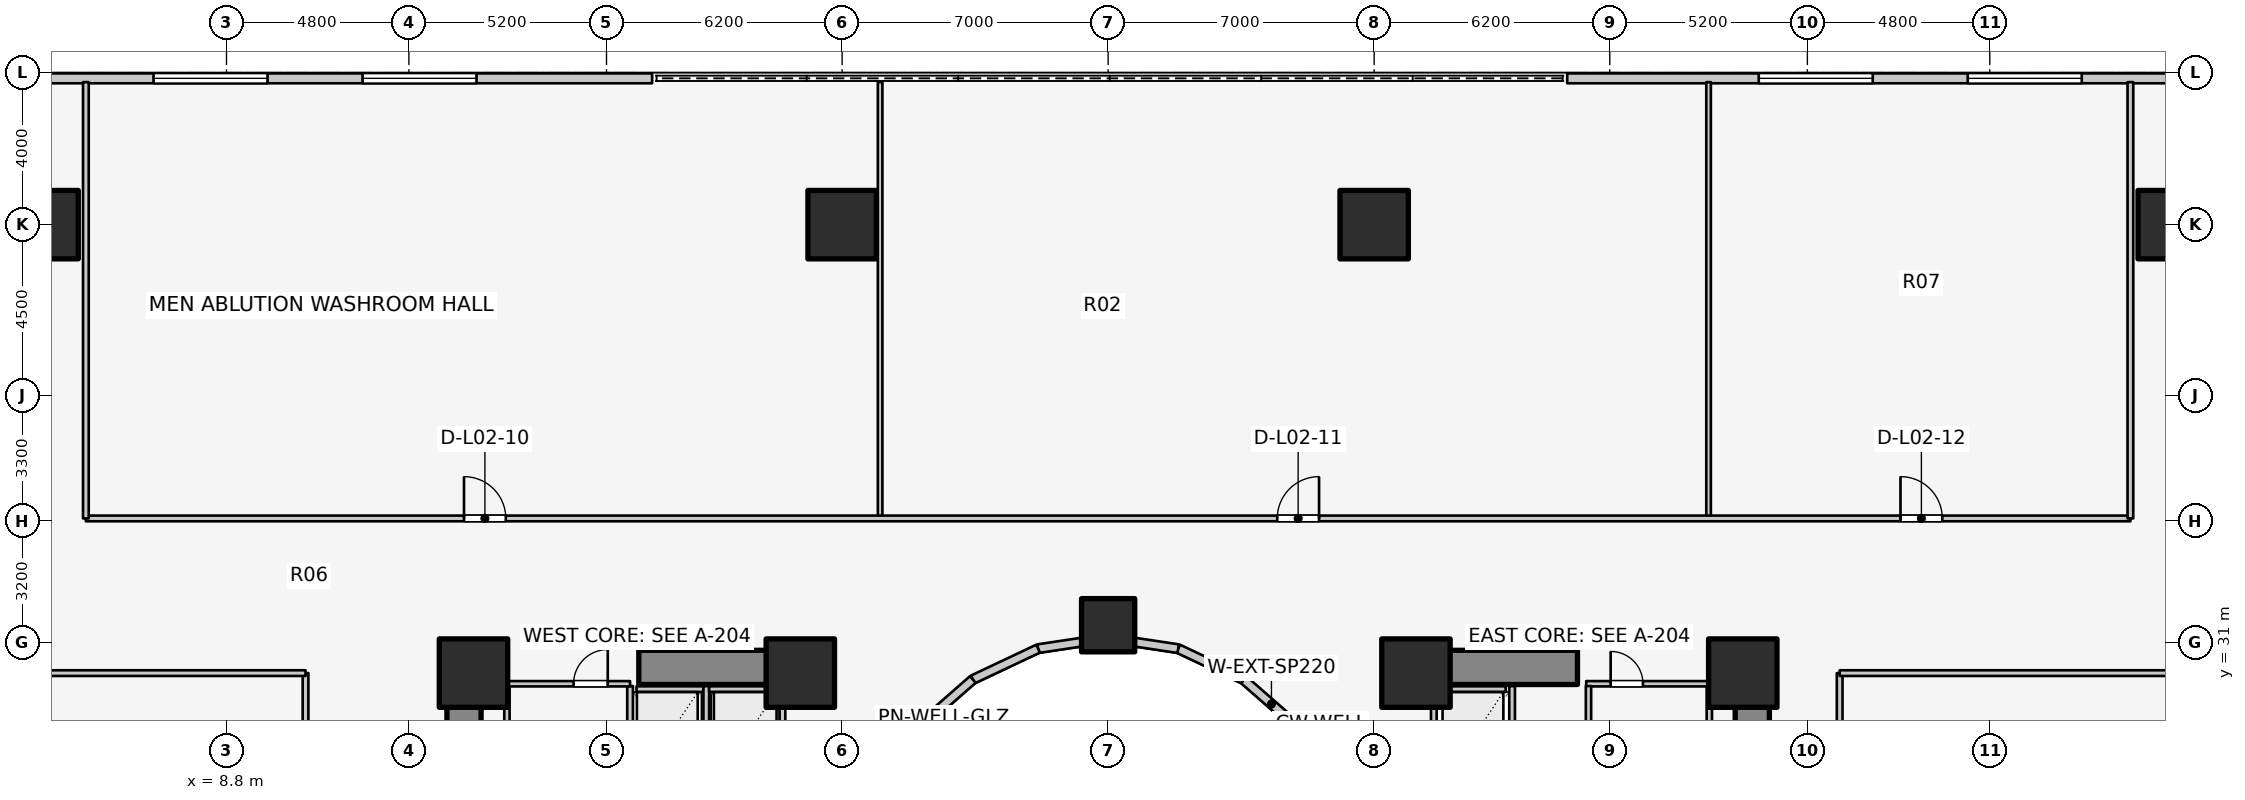
"""IFC4 building model, lengths in metres.
Left out: names, types, materials, properties, quantities, classifications, styles, units other than length and angle.
Written with IfcOpenShell. Run it as: python <this file> out.ifc"""

import sys

from ifc_helpers import new_model, si_unit, direction, frame, frame_2d, origin, origin_2d, place, context, subcontext, project, spatial, rectangle, extrude, element, fill, save


model = new_model("IFC4")
c1 = context("Model", 3, precision=1e-05, world=origin(), true_north=direction((0.0, 1.0)))
c2 = subcontext(c1, "Body", "Model", "MODEL_VIEW")
j1 = project(units=[si_unit("LENGTHUNIT", "METRE"), si_unit("PLANEANGLEUNIT", "RADIAN")], contexts=[c1])
p1 = place(None, origin())
s1 = spatial("IfcSite", under=j1, at=p1, CompositionType="ELEMENT")
p2 = place(p1, origin())
s2 = spatial("IfcBuilding", under=s1, at=p2, CompositionType="ELEMENT")
p3 = place(p2, frame((0.0, 0.0, 4.6)))
s3 = spatial("IfcBuildingStorey", under=s2, at=p3, CompositionType="ELEMENT", Elevation=4.6)
p4 = place(p3, frame((15.05, 17.05, 0.0), z_axis=(0.0, 0.0, 1.0), x_axis=(0.0, 1.0, 0.0)))
e1 = element("IfcWall", 1, at=p4, inside=s3, PredefinedType="SHEAR", context=c2, shape_type="SweptSolid", body=[
    extrude(rectangle(XDim=12.8, YDim=0.9, at=frame_2d((6.4, 0.0))), origin(), (0.0, 0.0, 1.0), 4.6),
])
p5 = place(p3, frame((19.65, 30.35, 0.0), z_axis=(0.0, 0.0, 1.0), x_axis=(1.0, 0.0, 0.0)))
e2 = element("IfcWall", 2, at=p5, inside=s3, PredefinedType="SHEAR", context=c2, shape_type="SweptSolid", body=[
    extrude(rectangle(XDim=4.5, YDim=0.9, at=frame_2d((2.25, 0.0))), origin(), (0.0, 0.0, 1.0), 4.6),
])
p6 = place(p3, frame((48.95, 17.05, 0.0), z_axis=(0.0, 0.0, 1.0), x_axis=(0.0, 1.0, 0.0)))
e3 = element("IfcWall", 3, at=p6, inside=s3, PredefinedType="SHEAR", context=c2, shape_type="SweptSolid", body=[
    extrude(rectangle(XDim=12.8, YDim=0.9, at=frame_2d((6.4, 0.0))), origin(), (0.0, 0.0, 1.0), 4.6),
])
p7 = place(p3, frame((39.85, 30.35, 0.0), z_axis=(0.0, 0.0, 1.0), x_axis=(1.0, 0.0, 0.0)))
e4 = element("IfcWall", 4, at=p7, inside=s3, PredefinedType="SHEAR", context=c2, shape_type="SweptSolid", body=[
    extrude(rectangle(XDim=4.5, YDim=0.9, at=frame_2d((2.25, 0.0))), origin(), (0.0, 0.0, 1.0), 4.6),
])
for number, where, z_axis, x_axis in (
    (5, (23.9, 30.2, 0.0), (0.0, 0.0, 1.0), (1.0, 0.0, 0.0)),
    (6, (15.3, 30.2, 0.0), (0.0, 0.0, 1.0), (1.0, 0.0, 0.0)),
    (7, (48.7, 30.2, 0.0), (0.0, 0.0, 1.0), (1.0, 0.0, 0.0)),
    (8, (40.1, 30.2, 0.0), (0.0, 0.0, 1.0), (1.0, 0.0, 0.0)),
    (9, (60.0, 42.0, 0.0), (0.0, 0.0, 1.0), (1.0, 0.0, 0.0)),
    (10, (39.0, 42.0, 0.0), (0.0, 0.0, 1.0), (1.0, 0.0, 0.0)),
    (11, (25.0, 42.0, 0.0), (0.0, 0.0, 1.0), (1.0, 0.0, 0.0)),
    (12, (4.0, 42.0, 0.0), (0.0, 0.0, 1.0), (1.0, 0.0, 0.0)),
):
    element("IfcColumn", number, at=place(p3, frame(where, z_axis=z_axis, x_axis=x_axis)), inside=s3, PredefinedType="COLUMN", context=c2, shape_type="SweptSolid", body=[
        extrude(rectangle(XDim=1.8, YDim=1.8, at=origin_2d()), origin(), (0.0, 0.0, 1.0), 4.6),
    ])
p8 = place(p3, frame((32.0, 31.46, 0.0), z_axis=(0.0, 0.0, 1.0), x_axis=(1.0, 0.0, 0.0)))
e13 = element("IfcColumn", 13, at=p8, inside=s3, PredefinedType="COLUMN", context=c2, shape_type="SweptSolid", body=[
    extrude(rectangle(XDim=1.4, YDim=1.4, at=origin_2d()), origin(), (0.0, 0.0, 1.0), 4.6),
])
p9 = place(p3, frame((63.72, 45.85, 0.0), z_axis=(0.0, 0.0, 1.0), x_axis=(-1.0, 0.0, 0.0)))
e14 = element("IfcWall", 14, at=p9, inside=s3, PredefinedType="STANDARD", context=c2, shape_type="SweptSolid", body=[
    extrude(rectangle(XDim=19.64, YDim=0.26, at=frame_2d((9.82, 0.0))), origin(), (0.0, 0.0, 1.0), 4.28),
])
p10 = place(p9, frame((6.1, 0.0, 0.9)))
e15 = element("IfcOpeningElement", 15, at=p10, cuts=e14, PredefinedType="OPENING", context=c2, shape_type="SweptSolid", body=[
    extrude(rectangle(XDim=3.0, YDim=2.4, at=frame_2d((1.5, 1.2))), frame((0.0, 0.14, 0.0), z_axis=(0.0, -1.0, 0.0), x_axis=(1.0, 0.0, 0.0)), (0.0, 0.0, 1.0), 0.28),
])
p11 = place(p9, frame((11.6, 0.0, 0.9)))
e16 = element("IfcOpeningElement", 16, at=p11, cuts=e14, PredefinedType="OPENING", context=c2, shape_type="SweptSolid", body=[
    extrude(rectangle(XDim=3.0, YDim=2.4, at=frame_2d((1.5, 1.2))), frame((0.0, 0.14, 0.0), z_axis=(0.0, -1.0, 0.0), x_axis=(1.0, 0.0, 0.0)), (0.0, 0.0, 1.0), 0.28),
])
p12 = place(p3, frame((20.0, 45.85, 0.0), z_axis=(0.0, 0.0, 1.0), x_axis=(-1.0, 0.0, 0.0)))
e17 = element("IfcWall", 17, at=p12, inside=s3, PredefinedType="STANDARD", context=c2, shape_type="SweptSolid", body=[
    extrude(rectangle(XDim=19.72, YDim=0.26, at=frame_2d((9.86, 0.0))), origin(), (0.0, 0.0, 1.0), 4.28),
])
p13 = place(p12, frame((4.62, 0.0, 0.9)))
e18 = element("IfcOpeningElement", 18, at=p13, cuts=e17, PredefinedType="OPENING", context=c2, shape_type="SweptSolid", body=[
    extrude(rectangle(XDim=3.0, YDim=2.4, at=frame_2d((1.5, 1.2))), frame((0.0, 0.14, 0.0), z_axis=(0.0, -1.0, 0.0), x_axis=(1.0, 0.0, 0.0)), (0.0, 0.0, 1.0), 0.28),
])
p14 = place(p12, frame((10.12, 0.0, 0.9)))
e19 = element("IfcOpeningElement", 19, at=p14, cuts=e17, PredefinedType="OPENING", context=c2, shape_type="SweptSolid", body=[
    extrude(rectangle(XDim=3.0, YDim=2.4, at=frame_2d((1.5, 1.2))), frame((0.0, 0.14, 0.0), z_axis=(0.0, -1.0, 0.0), x_axis=(1.0, 0.0, 0.0)), (0.0, 0.0, 1.0), 0.28),
])
p15 = place(p3, frame((37.035, 28.742, 0.0), z_axis=(0.0, 0.0, 1.0), x_axis=(-0.752576694707, 0.658504607869, 0.0)))
e20 = element("IfcWall", 20, at=p15, inside=s3, PredefinedType="STANDARD", context=c2, shape_type="SweptSolid", body=[
    extrude(rectangle(XDim=1.959, YDim=0.23, at=frame_2d((0.98, 0.0))), origin(), (0.0, 0.0, 1.0), 3.28),
])
p16 = place(p3, frame((35.56, 30.032, 0.0), z_axis=(0.0, 0.0, 1.0), x_axis=(-0.904179699603, 0.427152280606, 0.0)))
e21 = element("IfcWall", 21, at=p16, inside=s3, PredefinedType="STANDARD", context=c2, shape_type="SweptSolid", body=[
    extrude(rectangle(XDim=1.899, YDim=0.23, at=frame_2d((0.95, 0.0))), origin(), (0.0, 0.0, 1.0), 3.28),
])
for number, where, z_axis, x_axis in (
    (22, (33.843, 30.843, 0.0), (0.0, 0.0, 1.0), (-0.989, 0.149, 0.0)),
    (23, (32.0, 31.12, 0.0), (0.0, 0.0, 1.0), (-0.989, -0.149, 0.0)),
):
    element("IfcWall", number, at=place(p3, frame(where, z_axis=z_axis, x_axis=x_axis)), inside=s3, PredefinedType="STANDARD", context=c2, shape_type="SweptSolid", body=[
        extrude(rectangle(XDim=1.864, YDim=0.23, at=frame_2d((0.932, 0.0))), origin(), (0.0, 0.0, 1.0), 3.28),
    ])
p17 = place(p3, frame((30.157, 30.843, 0.0), z_axis=(0.0, 0.0, 1.0), x_axis=(-0.904179699603, -0.427152280606, 0.0)))
e24 = element("IfcWall", 24, at=p17, inside=s3, PredefinedType="STANDARD", context=c2, shape_type="SweptSolid", body=[
    extrude(rectangle(XDim=1.899, YDim=0.23, at=frame_2d((0.95, 0.0))), origin(), (0.0, 0.0, 1.0), 3.28),
])
p18 = place(p3, frame((28.44, 30.032, 0.0), z_axis=(0.0, 0.0, 1.0), x_axis=(-0.752576694707, -0.658504607869, 0.0)))
e25 = element("IfcWall", 25, at=p18, inside=s3, PredefinedType="STANDARD", context=c2, shape_type="SweptSolid", body=[
    extrude(rectangle(XDim=1.959, YDim=0.23, at=frame_2d((0.98, 0.0))), origin(), (0.0, 0.0, 1.0), 3.28),
])
p19 = place(p3, frame((19.59, 29.78, 0.0), z_axis=(0.0, 0.0, 1.0), x_axis=(1.0, 0.0, 0.0)))
e26 = element("IfcWall", 26, at=p19, inside=s3, PredefinedType="SOLIDWALL", context=c2, shape_type="SweptSolid", body=[
    extrude(rectangle(XDim=1.76, YDim=0.15, at=frame_2d((0.88, 0.0))), origin(), (0.0, 0.0, 1.0), 4.255),
])
for number, where, z_axis, x_axis in (
    (27, (19.42, 27.14, 0.0), (0.0, 0.0, 1.0), (0.0, 1.0, 0.0)),
    (28, (21.425, 27.14, 0.0), (0.0, 0.0, 1.0), (0.0, 1.0, 0.0)),
):
    element("IfcWall", number, at=place(p3, frame(where, z_axis=z_axis, x_axis=x_axis)), inside=s3, PredefinedType="SOLIDWALL", context=c2, shape_type="SweptSolid", body=[
        extrude(rectangle(XDim=2.72, YDim=0.15, at=frame_2d((1.36, 0.0))), origin(), (0.0, 0.0, 1.0), 4.255),
    ])
p20 = place(p3, frame((21.5, 29.78, 0.0), z_axis=(0.0, 0.0, 1.0), x_axis=(1.0, 0.0, 0.0)))
e29 = element("IfcWall", 29, at=p20, inside=s3, PredefinedType="SOLIDWALL", context=c2, shape_type="SweptSolid", body=[
    extrude(rectangle(XDim=1.76, YDim=0.15, at=frame_2d((0.88, 0.0))), origin(), (0.0, 0.0, 1.0), 4.255),
])
p21 = place(p3, frame((23.43, 27.14, 0.0), z_axis=(0.0, 0.0, 1.0), x_axis=(0.0, 1.0, 0.0)))
e30 = element("IfcWall", 30, at=p21, inside=s3, PredefinedType="SOLIDWALL", context=c2, shape_type="SweptSolid", body=[
    extrude(rectangle(XDim=2.72, YDim=0.15, at=frame_2d((1.36, 0.0))), origin(), (0.0, 0.0, 1.0), 4.255),
])
p22 = place(p3, frame((40.74, 29.78, 0.0), z_axis=(0.0, 0.0, 1.0), x_axis=(1.0, 0.0, 0.0)))
e31 = element("IfcWall", 31, at=p22, inside=s3, PredefinedType="SOLIDWALL", context=c2, shape_type="SweptSolid", body=[
    extrude(rectangle(XDim=1.72, YDim=0.15, at=frame_2d((0.86, 0.0))), origin(), (0.0, 0.0, 1.0), 4.255),
])
for number, where, z_axis, x_axis in (
    (32, (40.57, 27.14, 0.0), (0.0, 0.0, 1.0), (0.0, 1.0, 0.0)),
    (33, (42.63, 27.14, 0.0), (0.0, 0.0, 1.0), (0.0, 1.0, 0.0)),
):
    element("IfcWall", number, at=place(p3, frame(where, z_axis=z_axis, x_axis=x_axis)), inside=s3, PredefinedType="SOLIDWALL", context=c2, shape_type="SweptSolid", body=[
        extrude(rectangle(XDim=2.72, YDim=0.15, at=frame_2d((1.36, 0.0))), origin(), (0.0, 0.0, 1.0), 4.255),
    ])
for number, where, z_axis, x_axis in (
    (34, (26.0, 34.32, 0.0), (0.0, 0.0, 1.0), (0.0, 1.0, 0.0)),
    (35, (47.8, 34.32, 0.0), (0.0, 0.0, 1.0), (0.0, 1.0, 0.0)),
):
    element("IfcWall", number, at=place(p3, frame(where, z_axis=z_axis, x_axis=x_axis)), inside=s3, PredefinedType="MOVABLE", context=c2, shape_type="SweptSolid", body=[
        extrude(rectangle(XDim=11.43, YDim=0.12, at=frame_2d((5.715, 0.0))), origin(), (0.0, 0.0, 1.0), 3.3),
    ])
p23 = place(p3, frame((5.1, 34.27, 0.0), z_axis=(0.0, 0.0, 1.0), x_axis=(1.0, 0.0, 0.0)))
e36 = element("IfcWall", 36, at=p23, inside=s3, PredefinedType="PARTITIONING", context=c2, shape_type="SweptSolid", body=[
    extrude(rectangle(XDim=53.8, YDim=0.15, at=frame_2d((26.9, 0.0))), origin(), (0.0, 0.0, 1.0), 3.3),
])
p24 = place(p23, frame((9.95, 0.0, 0.0)))
e37 = element("IfcOpeningElement", 37, at=p24, cuts=e36, PredefinedType="OPENING", context=c2, shape_type="SweptSolid", body=[
    extrude(rectangle(XDim=1.1, YDim=2.1, at=frame_2d((0.55, 1.05))), frame((0.0, 0.085, 0.0), z_axis=(0.0, -1.0, 0.0), x_axis=(1.0, 0.0, 0.0)), (0.0, 0.0, 1.0), 0.17),
])
p25 = place(p23, frame((31.35, 0.0, 0.0)))
e38 = element("IfcOpeningElement", 38, at=p25, cuts=e36, PredefinedType="OPENING", context=c2, shape_type="SweptSolid", body=[
    extrude(rectangle(XDim=1.1, YDim=2.1, at=frame_2d((0.55, 1.05))), frame((0.0, 0.085, 0.0), z_axis=(0.0, -1.0, 0.0), x_axis=(1.0, 0.0, 0.0)), (0.0, 0.0, 1.0), 0.17),
])
p26 = place(p23, frame((47.75, 0.0, 0.0)))
e39 = element("IfcOpeningElement", 39, at=p26, cuts=e36, PredefinedType="OPENING", context=c2, shape_type="SweptSolid", body=[
    extrude(rectangle(XDim=1.1, YDim=2.1, at=frame_2d((0.55, 1.05))), frame((0.0, 0.085, 0.0), z_axis=(0.0, -1.0, 0.0), x_axis=(1.0, 0.0, 0.0)), (0.0, 0.0, 1.0), 0.17),
])
for number, where, z_axis, x_axis in (
    (40, (5.1, 34.27, 0.0), (0.0, 0.0, 1.0), (0.0, 1.0, 0.0)),
    (41, (58.9, 34.27, 0.0), (0.0, 0.0, 1.0), (0.0, 1.0, 0.0)),
):
    element("IfcWall", number, at=place(p3, frame(where, z_axis=z_axis, x_axis=x_axis)), inside=s3, PredefinedType="PARTITIONING", context=c2, shape_type="SweptSolid", body=[
        extrude(rectangle(XDim=11.48, YDim=0.15, at=frame_2d((5.74, 0.0))), origin(), (0.0, 0.0, 1.0), 3.3),
    ])
p27 = place(p3, frame((51.25, 16.75, 0.0), z_axis=(0.0, 0.0, 1.0), x_axis=(0.0, 1.0, 0.0)))
e42 = element("IfcWall", 42, at=p27, inside=s3, PredefinedType="PARTITIONING", context=c2, shape_type="SweptSolid", body=[
    extrude(rectangle(XDim=13.45, YDim=0.15, at=frame_2d((6.725, 0.0))), origin(), (0.0, 0.0, 1.0), 4.255),
])
p28 = place(p27, frame((6.175, 0.0, 0.0)))
e43 = element("IfcOpeningElement", 43, at=p28, cuts=e42, PredefinedType="OPENING", context=c2, shape_type="SweptSolid", body=[
    extrude(rectangle(XDim=1.1, YDim=2.1, at=frame_2d((0.55, 1.05))), frame((0.0, 0.085, 0.0), z_axis=(0.0, -1.0, 0.0), x_axis=(1.0, 0.0, 0.0)), (0.0, 0.0, 1.0), 0.17),
])
p29 = place(p3, frame((51.25, 30.2, 0.0), z_axis=(0.0, 0.0, 1.0), x_axis=(1.0, 0.0, 0.0)))
e44 = element("IfcWall", 44, at=p29, inside=s3, PredefinedType="PARTITIONING", context=c2, shape_type="SweptSolid", body=[
    extrude(rectangle(XDim=12.53, YDim=0.15, at=frame_2d((6.265, 0.0))), origin(), (0.0, 0.0, 1.0), 3.3),
])
p30 = place(p3, frame((10.88, 19.12, 0.0), z_axis=(0.0, 0.0, 1.0), x_axis=(0.0, 1.0, 0.0)))
e45 = element("IfcWall", 45, at=p30, inside=s3, PredefinedType="PARTITIONING", context=c2, shape_type="SweptSolid", body=[
    extrude(rectangle(XDim=11.08, YDim=0.15, at=frame_2d((5.54, 0.0))), origin(), (0.0, 0.0, 1.0), 3.62),
])
p31 = place(p3, frame((0.25, 30.2, 0.0), z_axis=(0.0, 0.0, 1.0), x_axis=(1.0, 0.0, 0.0)))
e46 = element("IfcWall", 46, at=p31, inside=s3, PredefinedType="PARTITIONING", context=c2, shape_type="SweptSolid", body=[
    extrude(rectangle(XDim=10.63, YDim=0.15, at=frame_2d((5.315, 0.0))), origin(), (0.0, 0.0, 1.0), 3.3),
])
p32 = place(p3, frame((16.12, 29.92, 0.0), z_axis=(0.0, 0.0, 1.0), x_axis=(1.0, 0.0, 0.0)))
e47 = element("IfcWall", 47, at=p32, inside=s3, PredefinedType="PLUMBINGWALL", context=c2, shape_type="SweptSolid", body=[
    extrude(rectangle(XDim=3.3, YDim=0.14, at=frame_2d((1.65, 0.0))), origin(), (0.0, 0.0, 1.0), 4.255),
])
p33 = place(p32, frame((1.813, 0.0, 0.0)))
e48 = element("IfcOpeningElement", 48, at=p33, cuts=e47, PredefinedType="OPENING", context=c2, shape_type="SweptSolid", body=[
    extrude(rectangle(XDim=0.9, YDim=2.1, at=frame_2d((0.45, 1.05))), frame((0.0, 0.08, 0.0), z_axis=(0.0, -1.0, 0.0), x_axis=(1.0, 0.0, 0.0)), (0.0, 0.0, 1.0), 0.16),
])
p34 = place(p3, frame((16.18, 25.98, 0.0), z_axis=(0.0, 0.0, 1.0), x_axis=(0.0, 1.0, 0.0)))
e49 = element("IfcWall", 49, at=p34, inside=s3, PredefinedType="PLUMBINGWALL", context=c2, shape_type="SweptSolid", body=[
    extrude(rectangle(XDim=3.88, YDim=0.14, at=frame_2d((1.94, 0.0))), origin(), (0.0, 0.0, 1.0), 4.255),
])
p35 = place(p3, frame((44.58, 29.92, 0.0), z_axis=(0.0, 0.0, 1.0), x_axis=(1.0, 0.0, 0.0)))
e50 = element("IfcWall", 50, at=p35, inside=s3, PredefinedType="PLUMBINGWALL", context=c2, shape_type="SweptSolid", body=[
    extrude(rectangle(XDim=3.3, YDim=0.14, at=frame_2d((1.65, 0.0))), origin(), (0.0, 0.0, 1.0), 4.255),
])
p36 = place(p35, frame((0.643, 0.0, 0.0)))
e51 = element("IfcOpeningElement", 51, at=p36, cuts=e50, PredefinedType="OPENING", context=c2, shape_type="SweptSolid", body=[
    extrude(rectangle(XDim=0.85, YDim=2.05, at=frame_2d((0.425, 1.025))), frame((0.0, 0.08, 0.0), z_axis=(0.0, -1.0, 0.0), x_axis=(1.0, 0.0, 0.0)), (0.0, 0.0, 1.0), 0.16),
])
for number, where, z_axis, x_axis in (
    (52, (44.64, 25.98, 0.0), (0.0, 0.0, 1.0), (0.0, 1.0, 0.0)),
    (53, (47.82, 25.98, 0.0), (0.0, 0.0, 1.0), (0.0, 1.0, 0.0)),
):
    element("IfcWall", number, at=place(p3, frame(where, z_axis=z_axis, x_axis=x_axis)), inside=s3, PredefinedType="PLUMBINGWALL", context=c2, shape_type="SweptSolid", body=[
        extrude(rectangle(XDim=3.88, YDim=0.14, at=frame_2d((1.94, 0.0))), origin(), (0.0, 0.0, 1.0), 4.255),
    ])
p37 = place(p10, origin())
e54 = element("IfcWindow", 54, at=p37, inside=s3, PartitioningType="SINGLE_PANEL", PredefinedType="WINDOW", context=c2, shape_type="SweptSolid", body=[
    extrude(rectangle(XDim=3.0, YDim=2.4, at=frame_2d((1.5, 1.2))), frame((0.0, 0.03, 0.0), z_axis=(0.0, -1.0, 0.0), x_axis=(1.0, 0.0, 0.0)), (0.0, 0.0, 1.0), 0.06),
])
fill(e15, e54)
p38 = place(p11, origin())
e55 = element("IfcWindow", 55, at=p38, inside=s3, PartitioningType="SINGLE_PANEL", PredefinedType="WINDOW", context=c2, shape_type="SweptSolid", body=[
    extrude(rectangle(XDim=3.0, YDim=2.4, at=frame_2d((1.5, 1.2))), frame((0.0, 0.03, 0.0), z_axis=(0.0, -1.0, 0.0), x_axis=(1.0, 0.0, 0.0)), (0.0, 0.0, 1.0), 0.06),
])
fill(e16, e55)
p39 = place(p13, origin())
e56 = element("IfcWindow", 56, at=p39, inside=s3, PartitioningType="SINGLE_PANEL", PredefinedType="WINDOW", context=c2, shape_type="SweptSolid", body=[
    extrude(rectangle(XDim=3.0, YDim=2.4, at=frame_2d((1.5, 1.2))), frame((0.0, 0.03, 0.0), z_axis=(0.0, -1.0, 0.0), x_axis=(1.0, 0.0, 0.0)), (0.0, 0.0, 1.0), 0.06),
])
fill(e18, e56)
p40 = place(p14, origin())
e57 = element("IfcWindow", 57, at=p40, inside=s3, PartitioningType="SINGLE_PANEL", PredefinedType="WINDOW", context=c2, shape_type="SweptSolid", body=[
    extrude(rectangle(XDim=3.0, YDim=2.4, at=frame_2d((1.5, 1.2))), frame((0.0, 0.03, 0.0), z_axis=(0.0, -1.0, 0.0), x_axis=(1.0, 0.0, 0.0)), (0.0, 0.0, 1.0), 0.06),
])
fill(e19, e57)
p41 = place(p24, origin())
e58 = element("IfcDoor", 58, at=p41, inside=s3, OperationType="SINGLE_SWING_LEFT", PredefinedType="DOOR", context=c2, shape_type="SweptSolid", body=[
    extrude(rectangle(XDim=1.1, YDim=2.1, at=frame_2d((0.55, 1.05))), frame((0.0, 0.025, 0.0), z_axis=(0.0, -1.0, 0.0), x_axis=(1.0, 0.0, 0.0)), (0.0, 0.0, 1.0), 0.05),
])
fill(e37, e58)
p42 = place(p25, origin())
e59 = element("IfcDoor", 59, at=p42, inside=s3, OperationType="SINGLE_SWING_RIGHT", PredefinedType="DOOR", context=c2, shape_type="SweptSolid", body=[
    extrude(rectangle(XDim=1.1, YDim=2.1, at=frame_2d((0.55, 1.05))), frame((0.0, 0.025, 0.0), z_axis=(0.0, -1.0, 0.0), x_axis=(1.0, 0.0, 0.0)), (0.0, 0.0, 1.0), 0.05),
])
fill(e38, e59)
p43 = place(p26, origin())
e60 = element("IfcDoor", 60, at=p43, inside=s3, OperationType="SINGLE_SWING_LEFT", PredefinedType="DOOR", context=c2, shape_type="SweptSolid", body=[
    extrude(rectangle(XDim=1.1, YDim=2.1, at=frame_2d((0.55, 1.05))), frame((0.0, 0.025, 0.0), z_axis=(0.0, -1.0, 0.0), x_axis=(1.0, 0.0, 0.0)), (0.0, 0.0, 1.0), 0.05),
])
fill(e39, e60)
p44 = place(p33, origin())
e61 = element("IfcDoor", 61, at=p44, inside=s3, OperationType="SINGLE_SWING_RIGHT", PredefinedType="DOOR", context=c2, shape_type="SweptSolid", body=[
    extrude(rectangle(XDim=0.9, YDim=2.1, at=frame_2d((0.45, 1.05))), frame((0.0, 0.025, 0.0), z_axis=(0.0, -1.0, 0.0), x_axis=(1.0, 0.0, 0.0)), (0.0, 0.0, 1.0), 0.05),
])
fill(e48, e61)
p45 = place(p36, origin())
e62 = element("IfcDoor", 62, at=p45, inside=s3, OperationType="SINGLE_SWING_LEFT", PredefinedType="DOOR", context=c2, shape_type="SweptSolid", body=[
    extrude(rectangle(XDim=0.85, YDim=2.05, at=frame_2d((0.425, 1.025))), frame((0.0, 0.025, 0.0), z_axis=(0.0, -1.0, 0.0), x_axis=(1.0, 0.0, 0.0)), (0.0, 0.0, 1.0), 0.05),
])
fill(e51, e62)
save(model, sys.argv[1])
